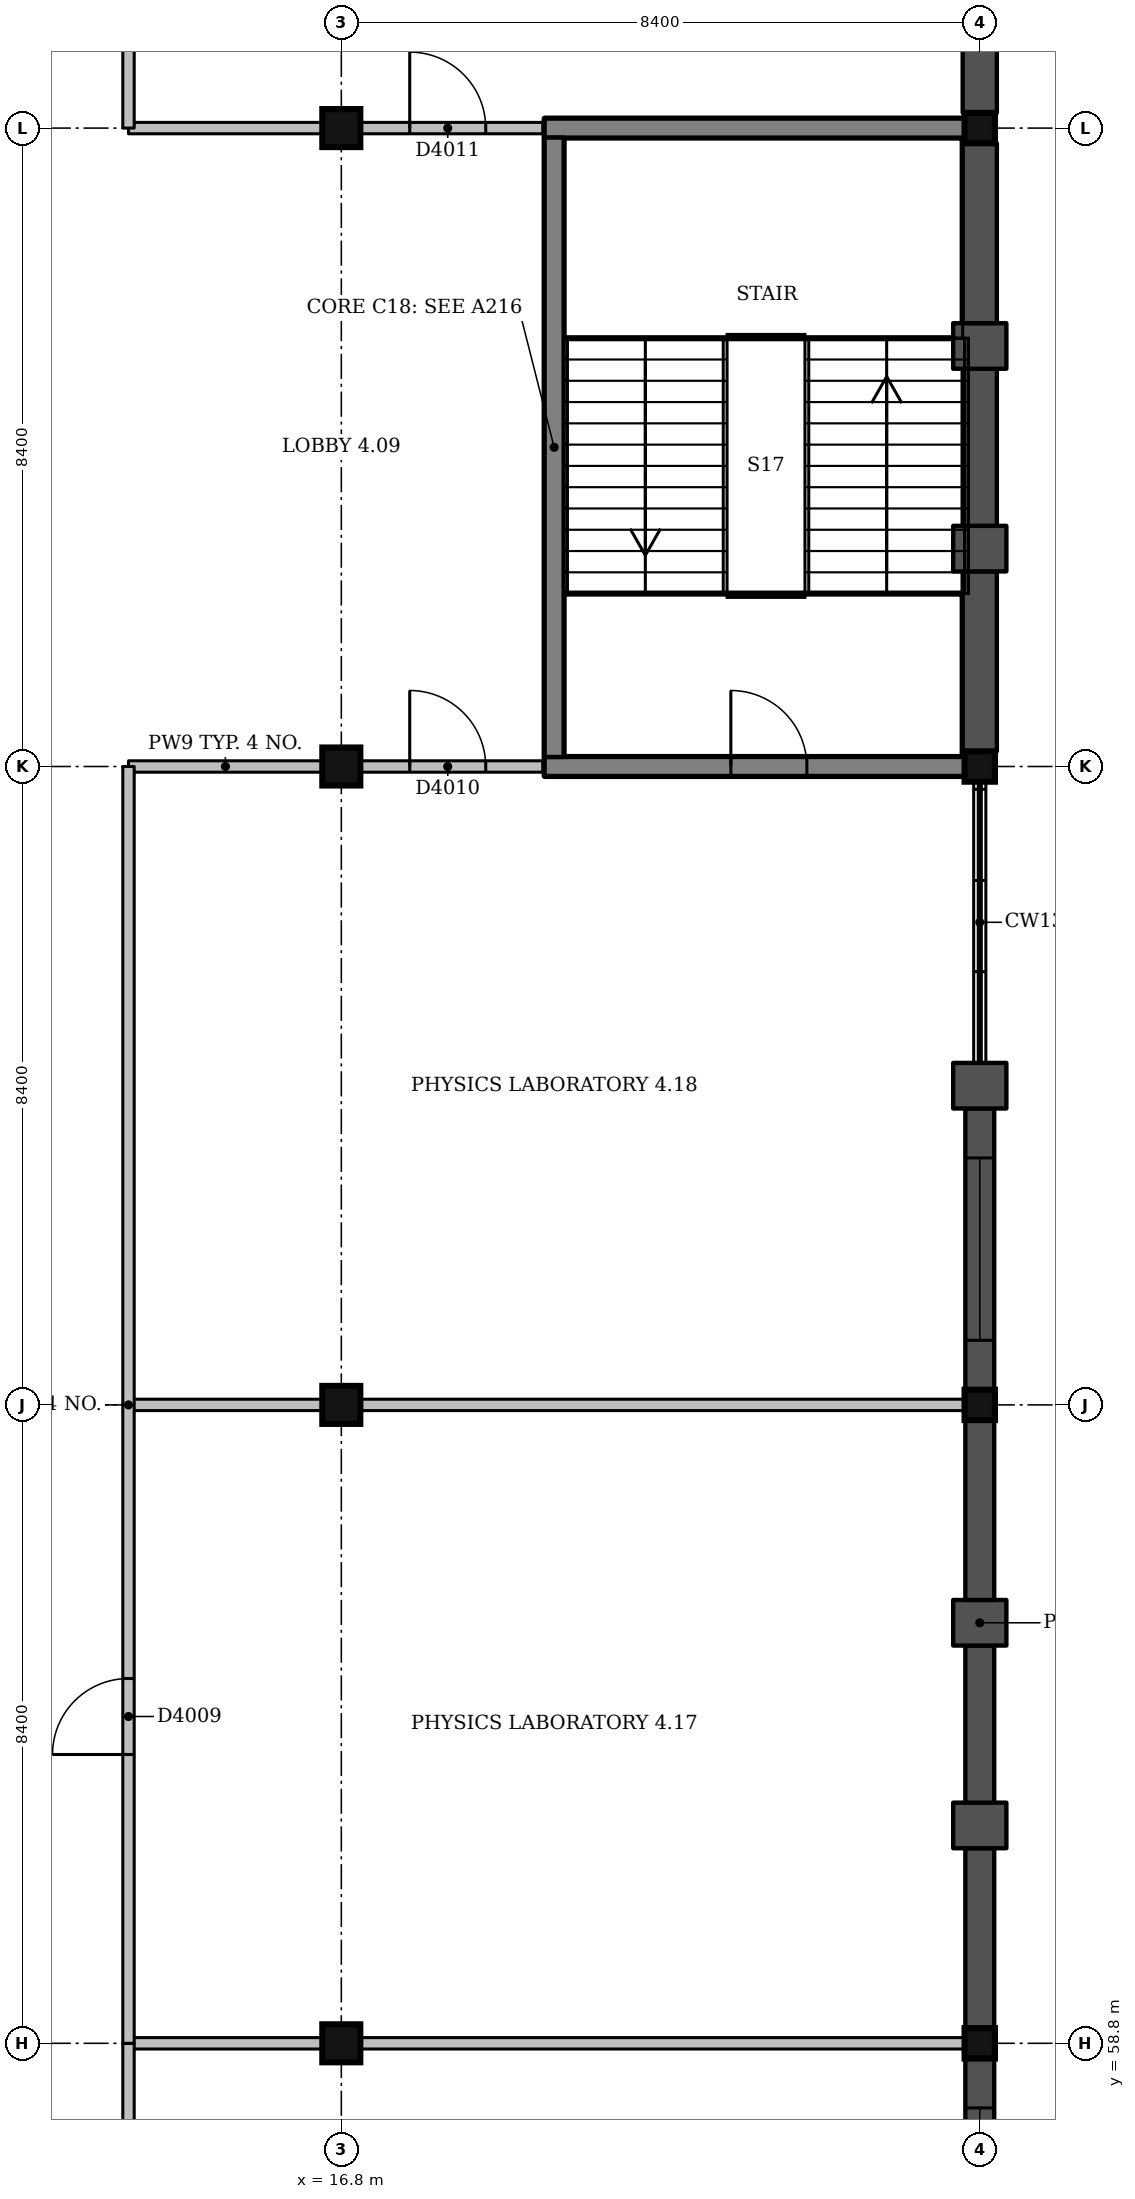
"""IFC4 building model, lengths in metres.
Left out: names, types, materials, properties, quantities, classifications, styles, units other than length and angle.
Written with IfcOpenShell. Run it as: python <this file> out.ifc"""

import sys

from ifc_helpers import new_model, si_unit, direction, frame, frame_2d, origin, origin_2d, place, context, subcontext, project, spatial, rectangle, extrude, element, fill, save


model = new_model("IFC4")
c1 = context("Model", 3, precision=1e-05, world=origin(), true_north=direction((0.0, 1.0)))
c2 = subcontext(c1, "Body", "Model", "MODEL_VIEW")
j1 = project(units=[si_unit("LENGTHUNIT", "METRE"), si_unit("PLANEANGLEUNIT", "RADIAN")], contexts=[c1])
p1 = place(None, origin())
s1 = spatial("IfcSite", under=j1, at=p1, CompositionType="ELEMENT")
p2 = place(p1, origin())
s2 = spatial("IfcBuilding", under=s1, at=p2, CompositionType="ELEMENT")
p3 = place(p2, frame((0.0, 0.0, 18.0)))
s3 = spatial("IfcBuildingStorey", under=s2, at=p3, CompositionType="ELEMENT", Elevation=18.0)
for number, where, z_axis, x_axis in (
    (1, (16.8, 58.8, 0.0), (0.0, 0.0, 1.0), (1.0, 0.0, 0.0)),
    (2, (16.8, 67.2, 0.0), (0.0, 0.0, 1.0), (1.0, 0.0, 0.0)),
    (3, (16.8, 75.6, 0.0), (0.0, 0.0, 1.0), (1.0, 0.0, 0.0)),
    (4, (16.8, 84.0, 0.0), (0.0, 0.0, 1.0), (1.0, 0.0, 0.0)),
):
    element("IfcColumn", number, at=place(p3, frame(where, z_axis=z_axis, x_axis=x_axis)), inside=s3, PredefinedType="COLUMN", context=c2, shape_type="SweptSolid", body=[
        extrude(rectangle(XDim=0.5, YDim=0.5, at=origin_2d()), origin(), (0.0, 0.0, 1.0), 4.5),
    ])
for number, where, z_axis, x_axis in (
    (5, (25.2, 58.8, 0.0), (0.0, 0.0, 1.0), (1.0, 0.0, 0.0)),
    (6, (25.2, 67.2, 0.0), (0.0, 0.0, 1.0), (1.0, 0.0, 0.0)),
    (7, (25.2, 75.6, 0.0), (0.0, 0.0, 1.0), (1.0, 0.0, 0.0)),
    (8, (25.2, 84.0, 0.0), (0.0, 0.0, 1.0), (1.0, 0.0, 0.0)),
):
    element("IfcColumn", number, at=place(p3, frame(where, z_axis=z_axis, x_axis=x_axis)), inside=s3, PredefinedType="COLUMN", context=c2, shape_type="SweptSolid", body=[
        extrude(rectangle(XDim=0.4, YDim=0.4, at=origin_2d()), origin(), (0.0, 0.0, 1.0), 4.5),
    ])
p4 = place(p3, frame((19.475, 75.6, 0.0), z_axis=(0.0, 0.0, 1.0), x_axis=(1.0, 0.0, 0.0)))
e9 = element("IfcWall", 9, at=p4, inside=s3, PredefinedType="SHEAR", context=c2, shape_type="SweptSolid", body=[
    extrude(rectangle(XDim=5.525, YDim=0.25, at=frame_2d((2.762, 0.0))), origin(), (0.0, 0.0, 1.0), 4.5),
])
p5 = place(p4, frame((2.45, 0.0, 0.0)))
e10 = element("IfcOpeningElement", 10, at=p5, cuts=e9, PredefinedType="OPENING", context=c2, shape_type="SweptSolid", body=[
    extrude(rectangle(XDim=1.0, YDim=2.1, at=frame_2d((0.5, 1.05))), frame((0.0, 0.135, 0.0), z_axis=(0.0, -1.0, 0.0), x_axis=(1.0, 0.0, 0.0)), (0.0, 0.0, 1.0), 0.27),
])
p6 = place(p3, frame((19.475, 84.0, 0.0), z_axis=(0.0, 0.0, 1.0), x_axis=(1.0, 0.0, 0.0)))
e11 = element("IfcWall", 11, at=p6, inside=s3, PredefinedType="SHEAR", context=c2, shape_type="SweptSolid", body=[
    extrude(rectangle(XDim=5.525, YDim=0.25, at=frame_2d((2.762, 0.0))), origin(), (0.0, 0.0, 1.0), 4.5),
])
p7 = place(p3, frame((19.6, 75.725, 0.0), z_axis=(0.0, 0.0, 1.0), x_axis=(0.0, 1.0, 0.0)))
e12 = element("IfcWall", 12, at=p7, inside=s3, PredefinedType="SHEAR", context=c2, shape_type="SweptSolid", body=[
    extrude(rectangle(XDim=8.15, YDim=0.25, at=frame_2d((4.075, 0.0))), origin(), (0.0, 0.0, 1.0), 4.5),
])
p8 = place(p3, frame((25.2, 54.9, 0.0), z_axis=(0.0, 0.0, 1.0), x_axis=(0.0, 1.0, 0.0)))
e13 = element("IfcWall", 13, at=p8, inside=s3, PredefinedType="SOLIDWALL", context=c2, shape_type="SweptSolid", body=[
    extrude(rectangle(XDim=3.7, YDim=0.38, at=frame_2d((1.85, 0.0))), origin(), (0.0, 0.0, 1.0), 4.2),
])
p9 = place(p8, frame((0.65, 0.0, 1.2)))
e14 = element("IfcOpeningElement", 14, at=p9, cuts=e13, PredefinedType="OPENING", context=c2, shape_type="SweptSolid", body=[
    extrude(rectangle(XDim=2.4, YDim=1.5, at=frame_2d((1.2, 0.75))), frame((0.0, 0.2, 0.0), z_axis=(0.0, -1.0, 0.0), x_axis=(1.0, 0.0, 0.0)), (0.0, 0.0, 1.0), 0.4),
])
p10 = place(p3, frame((25.2, 59.0, 0.0), z_axis=(0.0, 0.0, 1.0), x_axis=(0.0, 1.0, 0.0)))
e15 = element("IfcWall", 15, at=p10, inside=s3, PredefinedType="SOLIDWALL", context=c2, shape_type="SweptSolid", body=[
    extrude(rectangle(XDim=2.367, YDim=0.38, at=frame_2d((1.183, 0.0))), origin(), (0.0, 0.0, 1.0), 3.35),
])
p11 = place(p3, frame((25.2, 61.367, 0.0), z_axis=(0.0, 0.0, 1.0), x_axis=(0.0, 1.0, 0.0)))
e16 = element("IfcWall", 16, at=p11, inside=s3, PredefinedType="SOLIDWALL", context=c2, shape_type="SweptSolid", body=[
    extrude(rectangle(XDim=0.6, YDim=0.7, at=frame_2d((0.3, 0.0))), origin(), (0.0, 0.0, 1.0), 3.35),
])
p12 = place(p3, frame((25.2, 61.967, 0.0), z_axis=(0.0, 0.0, 1.0), x_axis=(0.0, 1.0, 0.0)))
e17 = element("IfcWall", 17, at=p12, inside=s3, PredefinedType="SOLIDWALL", context=c2, shape_type="SweptSolid", body=[
    extrude(rectangle(XDim=2.066, YDim=0.38, at=frame_2d((1.033, 0.0))), origin(), (0.0, 0.0, 1.0), 3.35),
])
p13 = place(p3, frame((25.2, 64.033, 0.0), z_axis=(0.0, 0.0, 1.0), x_axis=(0.0, 1.0, 0.0)))
e18 = element("IfcWall", 18, at=p13, inside=s3, PredefinedType="SOLIDWALL", context=c2, shape_type="SweptSolid", body=[
    extrude(rectangle(XDim=0.6, YDim=0.7, at=frame_2d((0.3, 0.0))), origin(), (0.0, 0.0, 1.0), 3.35),
])
p14 = place(p3, frame((25.2, 64.633, 0.0), z_axis=(0.0, 0.0, 1.0), x_axis=(0.0, 1.0, 0.0)))
e19 = element("IfcWall", 19, at=p14, inside=s3, PredefinedType="SOLIDWALL", context=c2, shape_type="SweptSolid", body=[
    extrude(rectangle(XDim=2.367, YDim=0.38, at=frame_2d((1.183, 0.0))), origin(), (0.0, 0.0, 1.0), 3.35),
])
p15 = place(p3, frame((25.2, 67.4, 0.0), z_axis=(0.0, 0.0, 1.0), x_axis=(0.0, 1.0, 0.0)))
e20 = element("IfcWall", 20, at=p15, inside=s3, PredefinedType="SOLIDWALL", context=c2, shape_type="SweptSolid", body=[
    extrude(rectangle(XDim=3.7, YDim=0.38, at=frame_2d((1.85, 0.0))), origin(), (0.0, 0.0, 1.0), 3.35),
])
p16 = place(p15, frame((0.65, 0.0, 1.2)))
e21 = element("IfcOpeningElement", 21, at=p16, cuts=e20, PredefinedType="OPENING", context=c2, shape_type="SweptSolid", body=[
    extrude(rectangle(XDim=2.4, YDim=1.5, at=frame_2d((1.2, 0.75))), frame((0.0, 0.2, 0.0), z_axis=(0.0, -1.0, 0.0), x_axis=(1.0, 0.0, 0.0)), (0.0, 0.0, 1.0), 0.4),
])
p17 = place(p3, frame((25.2, 71.1, 0.0), z_axis=(0.0, 0.0, 1.0), x_axis=(0.0, 1.0, 0.0)))
e22 = element("IfcWall", 22, at=p17, inside=s3, PredefinedType="SOLIDWALL", context=c2, shape_type="SweptSolid", body=[
    extrude(rectangle(XDim=0.6, YDim=0.7, at=frame_2d((0.3, 0.0))), origin(), (0.0, 0.0, 1.0), 3.35),
])
p18 = place(p3, frame((25.2, 75.8, 0.0), z_axis=(0.0, 0.0, 1.0), x_axis=(0.0, 1.0, 0.0)))
e23 = element("IfcWall", 23, at=p18, inside=s3, PredefinedType="SOLIDWALL", context=c2, shape_type="SweptSolid", body=[
    extrude(rectangle(XDim=2.367, YDim=0.45, at=frame_2d((1.183, 0.0))), origin(), (0.0, 0.0, 1.0), 3.65),
])
p19 = place(p3, frame((25.2, 78.167, 0.0), z_axis=(0.0, 0.0, 1.0), x_axis=(0.0, 1.0, 0.0)))
e24 = element("IfcWall", 24, at=p19, inside=s3, PredefinedType="SOLIDWALL", context=c2, shape_type="SweptSolid", body=[
    extrude(rectangle(XDim=0.6, YDim=0.7, at=frame_2d((0.3, 0.0))), origin(), (0.0, 0.0, 1.0), 3.65),
])
p20 = place(p3, frame((25.2, 78.767, 0.0), z_axis=(0.0, 0.0, 1.0), x_axis=(0.0, 1.0, 0.0)))
e25 = element("IfcWall", 25, at=p20, inside=s3, PredefinedType="SOLIDWALL", context=c2, shape_type="SweptSolid", body=[
    extrude(rectangle(XDim=2.067, YDim=0.45, at=frame_2d((1.033, 0.0))), origin(), (0.0, 0.0, 1.0), 3.65),
])
p21 = place(p3, frame((25.2, 80.833, 0.0), z_axis=(0.0, 0.0, 1.0), x_axis=(0.0, 1.0, 0.0)))
e26 = element("IfcWall", 26, at=p21, inside=s3, PredefinedType="SOLIDWALL", context=c2, shape_type="SweptSolid", body=[
    extrude(rectangle(XDim=0.6, YDim=0.7, at=frame_2d((0.3, 0.0))), origin(), (0.0, 0.0, 1.0), 3.65),
])
p22 = place(p3, frame((25.2, 81.433, 0.0), z_axis=(0.0, 0.0, 1.0), x_axis=(0.0, 1.0, 0.0)))
e27 = element("IfcWall", 27, at=p22, inside=s3, PredefinedType="SOLIDWALL", context=c2, shape_type="SweptSolid", body=[
    extrude(rectangle(XDim=2.367, YDim=0.45, at=frame_2d((1.183, 0.0))), origin(), (0.0, 0.0, 1.0), 3.65),
])
p23 = place(p3, frame((25.2, 84.2, 0.0), z_axis=(0.0, 0.0, 1.0), x_axis=(0.0, 1.0, 0.0)))
e28 = element("IfcWall", 28, at=p23, inside=s3, PredefinedType="SOLIDWALL", context=c2, shape_type="SweptSolid", body=[
    extrude(rectangle(XDim=2.367, YDim=0.45, at=frame_2d((1.183, 0.0))), origin(), (0.0, 0.0, 1.0), 3.35),
])
p24 = place(p3, frame((14.0, 58.8, 0.0), z_axis=(0.0, 0.0, 1.0), x_axis=(1.0, 0.0, 0.0)))
e29 = element("IfcWall", 29, at=p24, inside=s3, PredefinedType="PARTITIONING", context=c2, shape_type="SweptSolid", body=[
    extrude(rectangle(XDim=2.55, YDim=0.15, at=frame_2d((1.275, 0.0))), origin(), (0.0, 0.0, 1.0), 3.4),
])
p25 = place(p3, frame((17.05, 58.8, 0.0), z_axis=(0.0, 0.0, 1.0), x_axis=(1.0, 0.0, 0.0)))
e30 = element("IfcWall", 30, at=p25, inside=s3, PredefinedType="PARTITIONING", context=c2, shape_type="SweptSolid", body=[
    extrude(rectangle(XDim=7.95, YDim=0.15, at=frame_2d((3.975, 0.0))), origin(), (0.0, 0.0, 1.0), 3.35),
])
p26 = place(p3, frame((14.0, 67.2, 0.0), z_axis=(0.0, 0.0, 1.0), x_axis=(1.0, 0.0, 0.0)))
e31 = element("IfcWall", 31, at=p26, inside=s3, PredefinedType="PARTITIONING", context=c2, shape_type="SweptSolid", body=[
    extrude(rectangle(XDim=2.55, YDim=0.15, at=frame_2d((1.275, 0.0))), origin(), (0.0, 0.0, 1.0), 3.4),
])
p27 = place(p3, frame((17.05, 67.2, 0.0), z_axis=(0.0, 0.0, 1.0), x_axis=(1.0, 0.0, 0.0)))
e32 = element("IfcWall", 32, at=p27, inside=s3, PredefinedType="PARTITIONING", context=c2, shape_type="SweptSolid", body=[
    extrude(rectangle(XDim=7.95, YDim=0.15, at=frame_2d((3.975, 0.0))), origin(), (0.0, 0.0, 1.0), 3.35),
])
p28 = place(p3, frame((14.0, 75.6, 0.0), z_axis=(0.0, 0.0, 1.0), x_axis=(1.0, 0.0, 0.0)))
e33 = element("IfcWall", 33, at=p28, inside=s3, PredefinedType="PARTITIONING", context=c2, shape_type="SweptSolid", body=[
    extrude(rectangle(XDim=2.55, YDim=0.15, at=frame_2d((1.275, 0.0))), origin(), (0.0, 0.0, 1.0), 3.4),
])
p29 = place(p3, frame((17.05, 75.6, 0.0), z_axis=(0.0, 0.0, 1.0), x_axis=(1.0, 0.0, 0.0)))
e34 = element("IfcWall", 34, at=p29, inside=s3, PredefinedType="PARTITIONING", context=c2, shape_type="SweptSolid", body=[
    extrude(rectangle(XDim=2.4, YDim=0.15, at=frame_2d((1.2, 0.0))), origin(), (0.0, 0.0, 1.0), 3.5),
])
p30 = place(p29, frame((0.65, 0.0, 0.0)))
e35 = element("IfcOpeningElement", 35, at=p30, cuts=e34, PredefinedType="OPENING", context=c2, shape_type="SweptSolid", body=[
    extrude(rectangle(XDim=1.0, YDim=2.1, at=frame_2d((0.5, 1.05))), frame((0.0, 0.085, 0.0), z_axis=(0.0, -1.0, 0.0), x_axis=(1.0, 0.0, 0.0)), (0.0, 0.0, 1.0), 0.17),
])
p31 = place(p3, frame((14.0, 84.0, 0.0), z_axis=(0.0, 0.0, 1.0), x_axis=(1.0, 0.0, 0.0)))
e36 = element("IfcWall", 36, at=p31, inside=s3, PredefinedType="PARTITIONING", context=c2, shape_type="SweptSolid", body=[
    extrude(rectangle(XDim=2.55, YDim=0.15, at=frame_2d((1.275, 0.0))), origin(), (0.0, 0.0, 1.0), 3.4),
])
p32 = place(p3, frame((17.05, 84.0, 0.0), z_axis=(0.0, 0.0, 1.0), x_axis=(1.0, 0.0, 0.0)))
e37 = element("IfcWall", 37, at=p32, inside=s3, PredefinedType="PARTITIONING", context=c2, shape_type="SweptSolid", body=[
    extrude(rectangle(XDim=2.4, YDim=0.15, at=frame_2d((1.2, 0.0))), origin(), (0.0, 0.0, 1.0), 3.5),
])
p33 = place(p32, frame((0.65, 0.0, 0.0)))
e38 = element("IfcOpeningElement", 38, at=p33, cuts=e37, PredefinedType="OPENING", context=c2, shape_type="SweptSolid", body=[
    extrude(rectangle(XDim=1.0, YDim=2.1, at=frame_2d((0.5, 1.05))), frame((0.0, 0.085, 0.0), z_axis=(0.0, -1.0, 0.0), x_axis=(1.0, 0.0, 0.0)), (0.0, 0.0, 1.0), 0.17),
])
p34 = place(p3, frame((14.0, 50.61, 0.0), z_axis=(0.0, 0.0, 1.0), x_axis=(0.0, 1.0, 0.0)))
e39 = element("IfcWall", 39, at=p34, inside=s3, PredefinedType="PARTITIONING", context=c2, shape_type="SweptSolid", body=[
    extrude(rectangle(XDim=8.19, YDim=0.15, at=frame_2d((4.095, 0.0))), origin(), (0.0, 0.0, 1.0), 3.4),
])
p35 = place(p34, frame((3.8, 0.0, 0.0)))
e40 = element("IfcOpeningElement", 40, at=p35, cuts=e39, PredefinedType="OPENING", context=c2, shape_type="SweptSolid", body=[
    extrude(rectangle(XDim=0.9, YDim=2.1, at=frame_2d((0.45, 1.05))), frame((0.0, 0.085, 0.0), z_axis=(0.0, -1.0, 0.0), x_axis=(1.0, 0.0, 0.0)), (0.0, 0.0, 1.0), 0.17),
])
p36 = place(p3, frame((14.0, 58.8, 0.0), z_axis=(0.0, 0.0, 1.0), x_axis=(0.0, 1.0, 0.0)))
e41 = element("IfcWall", 41, at=p36, inside=s3, PredefinedType="PARTITIONING", context=c2, shape_type="SweptSolid", body=[
    extrude(rectangle(XDim=16.8, YDim=0.15, at=frame_2d((8.4, 0.0))), origin(), (0.0, 0.0, 1.0), 3.4),
])
p37 = place(p36, frame((3.8, 0.0, 0.0)))
e42 = element("IfcOpeningElement", 42, at=p37, cuts=e41, PredefinedType="OPENING", context=c2, shape_type="SweptSolid", body=[
    extrude(rectangle(XDim=1.0, YDim=2.1, at=frame_2d((0.5, 1.05))), frame((0.0, 0.085, 0.0), z_axis=(0.0, -1.0, 0.0), x_axis=(1.0, 0.0, 0.0)), (0.0, 0.0, 1.0), 0.17),
])
p38 = place(p3, frame((14.0, 84.0, 0.0), z_axis=(0.0, 0.0, 1.0), x_axis=(0.0, 1.0, 0.0)))
e43 = element("IfcWall", 43, at=p38, inside=s3, PredefinedType="PARTITIONING", context=c2, shape_type="SweptSolid", body=[
    extrude(rectangle(XDim=8.4, YDim=0.15, at=frame_2d((4.2, 0.0))), origin(), (0.0, 0.0, 1.0), 3.4),
])
p39 = place(p9, origin())
e44 = element("IfcWindow", 44, at=p39, inside=s3, PartitioningType="SINGLE_PANEL", PredefinedType="WINDOW", context=c2, shape_type="SweptSolid", body=[
    extrude(rectangle(XDim=2.4, YDim=1.5, at=frame_2d((1.2, 0.75))), frame((0.0, 0.15, 0.0), z_axis=(0.0, -1.0, 0.0), x_axis=(1.0, 0.0, 0.0)), (0.0, 0.0, 1.0), 0.06),
])
fill(e14, e44)
p40 = place(p16, origin())
e45 = element("IfcWindow", 45, at=p40, inside=s3, PartitioningType="SINGLE_PANEL", PredefinedType="WINDOW", context=c2, shape_type="SweptSolid", body=[
    extrude(rectangle(XDim=2.4, YDim=1.5, at=frame_2d((1.2, 0.75))), frame((0.0, 0.15, 0.0), z_axis=(0.0, -1.0, 0.0), x_axis=(1.0, 0.0, 0.0)), (0.0, 0.0, 1.0), 0.06),
])
fill(e21, e45)
p41 = place(p37, origin())
e46 = element("IfcDoor", 46, at=p41, inside=s3, OperationType="SINGLE_SWING_LEFT", PredefinedType="DOOR", context=c2, shape_type="SweptSolid", body=[
    extrude(rectangle(XDim=1.0, YDim=2.1, at=frame_2d((0.5, 1.05))), frame((0.0, 0.025, 0.0), z_axis=(0.0, -1.0, 0.0), x_axis=(1.0, 0.0, 0.0)), (0.0, 0.0, 1.0), 0.05),
])
fill(e42, e46)
p42 = place(p30, origin())
e47 = element("IfcDoor", 47, at=p42, inside=s3, OperationType="SINGLE_SWING_LEFT", PredefinedType="DOOR", context=c2, shape_type="SweptSolid", body=[
    extrude(rectangle(XDim=1.0, YDim=2.1, at=frame_2d((0.5, 1.05))), frame((0.0, 0.025, 0.0), z_axis=(0.0, -1.0, 0.0), x_axis=(1.0, 0.0, 0.0)), (0.0, 0.0, 1.0), 0.05),
])
fill(e35, e47)
p43 = place(p33, origin())
e48 = element("IfcDoor", 48, at=p43, inside=s3, OperationType="SINGLE_SWING_LEFT", PredefinedType="DOOR", context=c2, shape_type="SweptSolid", body=[
    extrude(rectangle(XDim=1.0, YDim=2.1, at=frame_2d((0.5, 1.05))), frame((0.0, 0.025, 0.0), z_axis=(0.0, -1.0, 0.0), x_axis=(1.0, 0.0, 0.0)), (0.0, 0.0, 1.0), 0.05),
])
fill(e38, e48)
p44 = place(p5, origin())
e49 = element("IfcDoor", 49, at=p44, inside=s3, OperationType="SINGLE_SWING_LEFT", PredefinedType="DOOR", context=c2, shape_type="SweptSolid", body=[
    extrude(rectangle(XDim=1.0, YDim=2.1, at=frame_2d((0.5, 1.05))), frame((0.0, 0.025, 0.0), z_axis=(0.0, -1.0, 0.0), x_axis=(1.0, 0.0, 0.0)), (0.0, 0.0, 1.0), 0.05),
])
fill(e10, e49)
save(model, sys.argv[1])
